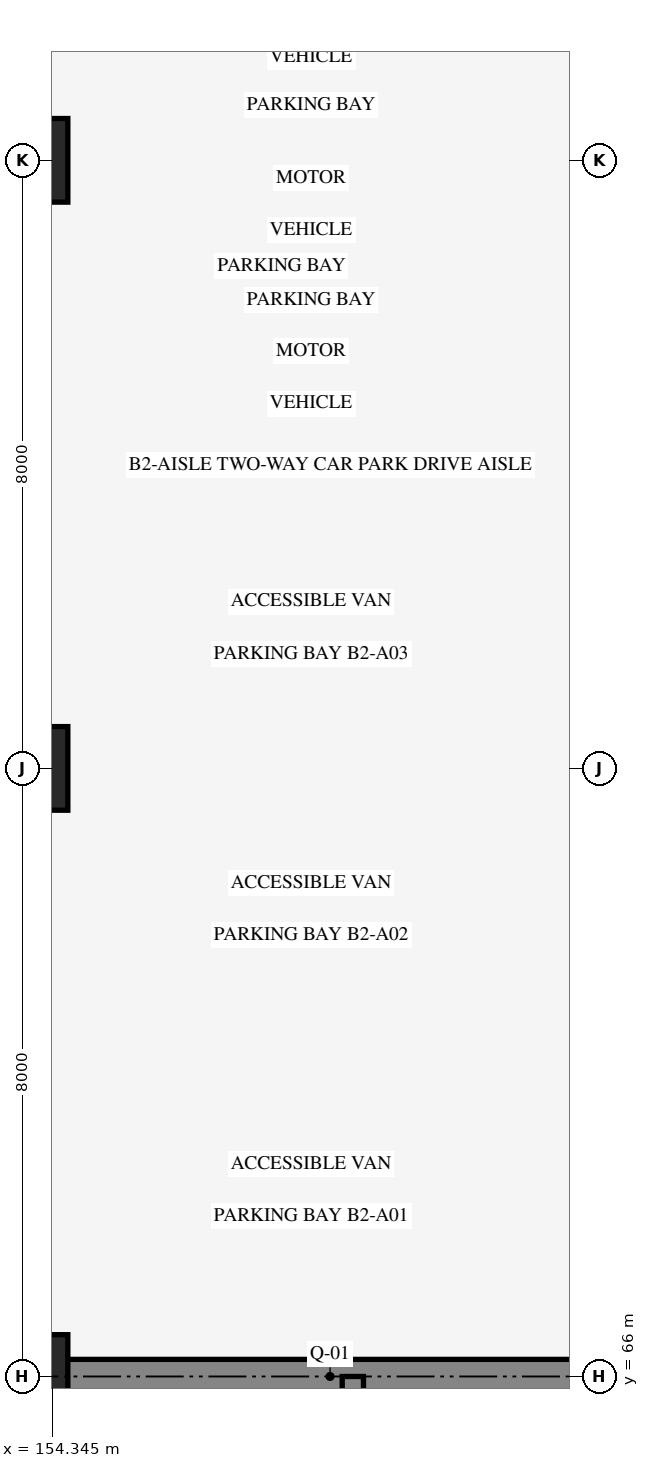
"""IFC4 building model, lengths in metres.
Left out: names, types, materials, properties, quantities, classifications, styles, units other than length and angle.
Written with IfcOpenShell. Run it as: python <this file> out.ifc"""

import sys

from ifc_helpers import new_model, si_unit, direction, frame, frame_2d, origin, origin_2d, place, context, subcontext, project, spatial, rectangle, extrude, element, save


model = new_model("IFC4")
c1 = context("Model", 3, precision=1e-05, world=origin(), true_north=direction((0.0, 1.0)))
c2 = subcontext(c1, "Body", "Model", "MODEL_VIEW")
j1 = project(units=[si_unit("LENGTHUNIT", "METRE"), si_unit("PLANEANGLEUNIT", "RADIAN")], contexts=[c1])
p1 = place(None, origin())
s1 = spatial("IfcSite", under=j1, at=p1, CompositionType="ELEMENT")
p2 = place(p1, origin())
s2 = spatial("IfcBuilding", under=s1, at=p2, CompositionType="ELEMENT")
p3 = place(p2, frame((0.0, 0.0, -9.0)))
s3 = spatial("IfcBuildingStorey", under=s2, at=p3, CompositionType="ELEMENT", Elevation=-9.0)
p4 = place(p3, frame((162.0, 66.0, 0.0), z_axis=(0.0, 0.0, 1.0), x_axis=(-1.0, 0.0, 0.0)))
e1 = element("IfcWall", 1, at=p4, inside=s3, PredefinedType="SHEAR", context=c2, shape_type="SweptSolid", body=[
    extrude(rectangle(XDim=8.0, YDim=0.45, at=frame_2d((4.0, 0.0))), origin(), (0.0, 0.0, 1.0), 4.22),
])
p5 = place(p3, frame((158.3, 58.0, 0.0), z_axis=(0.0, 0.0, 1.0), x_axis=(0.0, 1.0, 0.0)))
e2 = element("IfcWall", 2, at=p5, inside=s3, PredefinedType="SHEAR", context=c2, shape_type="SweptSolid", body=[
    extrude(rectangle(XDim=8.0, YDim=0.28, at=frame_2d((4.0, 0.0))), origin(), (0.0, 0.0, 1.0), 4.22),
])
for number, where, z_axis, x_axis in (
    (3, (154.0, 66.0, 0.0), (0.0, 0.0, 1.0), (1.0, 0.0, 0.0)),
    (4, (154.0, 74.0, 0.0), (0.0, 0.0, 1.0), (1.0, 0.0, 0.0)),
    (5, (154.0, 82.0, 0.0), (0.0, 0.0, 1.0), (1.0, 0.0, 0.0)),
):
    element("IfcColumn", number, at=place(p3, frame(where, z_axis=z_axis, x_axis=x_axis)), inside=s3, PredefinedType="COLUMN", context=c2, shape_type="SweptSolid", body=[
        extrude(rectangle(XDim=1.1, YDim=1.1, at=origin_2d()), origin(), (0.0, 0.0, 1.0), 4.5),
    ])
save(model, sys.argv[1])
